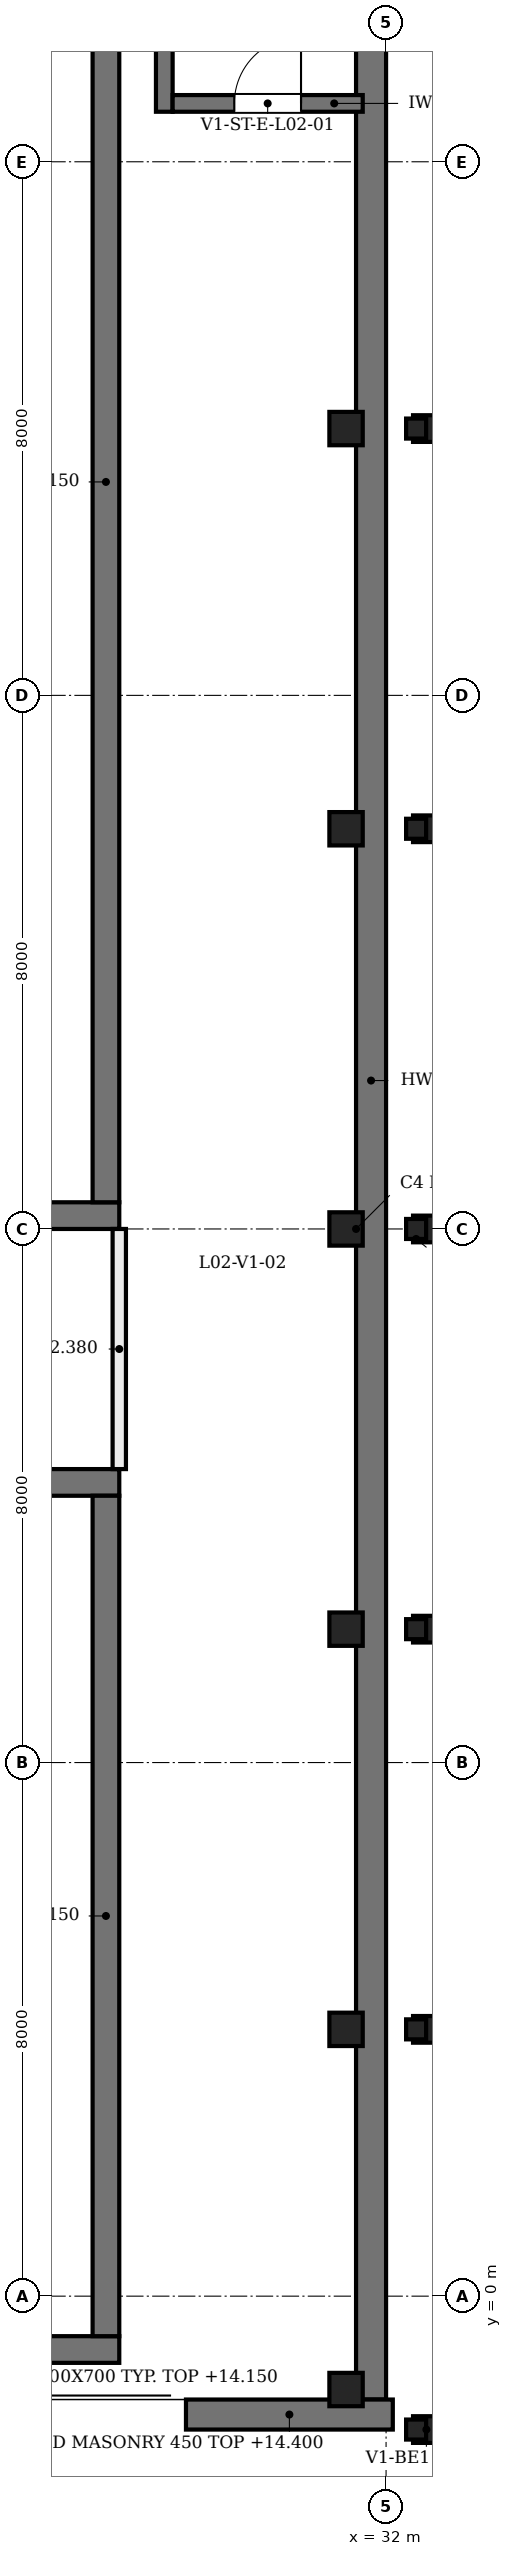
"""IFC4 building model, lengths in metres.
Left out: names, types, materials, properties, quantities, classifications, styles, units other than length and angle.
Written with IfcOpenShell. Run it as: python <this file> out.ifc"""

import sys

from ifc_helpers import new_model, si_unit, direction, frame, frame_2d, origin, origin_2d, place, context, subcontext, project, spatial, polyline, rectangle, hollow_rectangle, outline, extrude, element, fill, save


model = new_model("IFC4")
c1 = context("Model", 3, precision=1e-05, world=origin(), true_north=direction((0.0, 1.0)))
c2 = subcontext(c1, "Body", "Model", "MODEL_VIEW")
j1 = project(units=[si_unit("LENGTHUNIT", "METRE"), si_unit("PLANEANGLEUNIT", "RADIAN")], contexts=[c1])
p1 = place(None, origin())
s1 = spatial("IfcSite", under=j1, at=p1, CompositionType="ELEMENT")
p2 = place(p1, origin())
s2 = spatial("IfcBuilding", under=s1, at=p2, CompositionType="ELEMENT")
p3 = place(p2, frame((0.0, 0.0, 9.6)))
s3 = spatial("IfcBuildingStorey", under=s2, at=p3, CompositionType="ELEMENT", Elevation=9.6)
p4 = place(p3, frame((4.0, 16.2, 0.0), z_axis=(0.0, 0.0, 1.0), x_axis=(1.0, 0.0, 0.0)))
e1 = element("IfcWall", 1, at=p4, inside=s3, PredefinedType="SHEAR", context=c2, shape_type="SweptSolid", body=[
    extrude(rectangle(XDim=24.0, YDim=0.4, at=frame_2d((12.0, 0.0))), origin(), (0.0, 0.0, 1.0), 4.55),
])
p5 = place(p3, frame((27.8, 16.4, 0.0), z_axis=(0.0, 0.0, 1.0), x_axis=(0.0, 1.0, 0.0)))
e2 = element("IfcWall", 2, at=p5, inside=s3, PredefinedType="SHEAR", context=c2, shape_type="SweptSolid", body=[
    extrude(rectangle(XDim=22.6, YDim=0.4, at=frame_2d((11.3, 0.0))), origin(), (0.0, 0.0, 1.0), 4.55),
])
for number, where, z_axis, x_axis in (
    (3, (4.0, -0.8, 0.0), (0.0, 0.0, 1.0), (1.0, 0.0, 0.0)),
    (4, (4.0, 12.2, 0.0), (0.0, 0.0, 1.0), (1.0, 0.0, 0.0)),
):
    element("IfcWall", number, at=place(p3, frame(where, z_axis=z_axis, x_axis=x_axis)), inside=s3, PredefinedType="SHEAR", context=c2, shape_type="SweptSolid", body=[
        extrude(rectangle(XDim=24.0, YDim=0.4, at=frame_2d((12.0, 0.0))), origin(), (0.0, 0.0, 1.0), 4.55),
    ])
p6 = place(p3, frame((27.8, -0.6, 0.0), z_axis=(0.0, 0.0, 1.0), x_axis=(0.0, 1.0, 0.0)))
e5 = element("IfcWall", 5, at=p6, inside=s3, PredefinedType="SHEAR", context=c2, shape_type="SweptSolid", body=[
    extrude(rectangle(XDim=12.6, YDim=0.4, at=frame_2d((6.3, 0.0))), origin(), (0.0, 0.0, 1.0), 4.55),
])
for number, where, z_axis, x_axis in (
    (6, (31.4, -1.4, 0.0), (0.0, 0.0, 1.0), (1.0, 0.0, 0.0)),
    (7, (31.4, 4.0, 0.0), (0.0, 0.0, 1.0), (1.0, 0.0, 0.0)),
    (8, (31.4, 10.0, 0.0), (0.0, 0.0, 1.0), (1.0, 0.0, 0.0)),
    (9, (31.4, 16.0, 0.0), (0.0, 0.0, 1.0), (1.0, 0.0, 0.0)),
    (10, (31.4, 22.0, 0.0), (0.0, 0.0, 1.0), (1.0, 0.0, 0.0)),
    (11, (31.4, 28.0, 0.0), (0.0, 0.0, 1.0), (1.0, 0.0, 0.0)),
):
    element("IfcColumn", number, at=place(p3, frame(where, z_axis=z_axis, x_axis=x_axis)), inside=s3, PredefinedType="COLUMN", context=c2, shape_type="SweptSolid", body=[
        extrude(rectangle(XDim=0.5, YDim=0.5, at=origin_2d()), origin(), (0.0, 0.0, 1.0), 4.55),
    ])
p7 = place(p3, frame((32.726, -2.0, 0.0), z_axis=(-0.100917941267, 0.0, 0.994894752791), x_axis=(0.0, -1.0, 0.0)))
e12 = element("IfcColumn", 12, at=p7, inside=s3, PredefinedType="COLUMN", context=c2, shape_type="SweptSolid", body=[
    extrude(hollow_rectangle(XDim=0.4, YDim=0.4, WallThickness=0.016, InnerFilletRadius=0.016, OuterFilletRadius=0.024, at=origin_2d()), origin(), (0.0, 0.0, 1.0), 4.221),
])
p8 = place(p3, frame((32.45, -2.0, 4.22), z_axis=(0.0, 0.0, 1.0), x_axis=(1.0, 0.0, 0.0)))
e13 = element("IfcColumn", 13, at=p8, inside=s3, PredefinedType="COLUMN", context=c2, shape_type="SweptSolid", body=[
    extrude(hollow_rectangle(XDim=0.3, YDim=0.3, WallThickness=0.012, InnerFilletRadius=0.012, OuterFilletRadius=0.019, at=origin_2d()), origin(), (0.0, 0.0, 1.0), 0.579),
])
p9 = place(p3, frame((32.726, 4.0, 0.0), z_axis=(-0.100917941267, 0.0, 0.994894752791), x_axis=(0.0, -1.0, 0.0)))
e14 = element("IfcColumn", 14, at=p9, inside=s3, PredefinedType="COLUMN", context=c2, shape_type="SweptSolid", body=[
    extrude(hollow_rectangle(XDim=0.4, YDim=0.4, WallThickness=0.012, InnerFilletRadius=0.012, OuterFilletRadius=0.019, at=origin_2d()), origin(), (0.0, 0.0, 1.0), 4.221),
])
p10 = place(p3, frame((32.45, 4.0, 4.22), z_axis=(0.0, 0.0, 1.0), x_axis=(1.0, 0.0, 0.0)))
e15 = element("IfcColumn", 15, at=p10, inside=s3, PredefinedType="COLUMN", context=c2, shape_type="SweptSolid", body=[
    extrude(hollow_rectangle(XDim=0.3, YDim=0.3, WallThickness=0.012, InnerFilletRadius=0.012, OuterFilletRadius=0.019, at=origin_2d()), origin(), (0.0, 0.0, 1.0), 0.579),
])
p11 = place(p3, frame((32.726, 10.0, 0.0), z_axis=(-0.100917941267, 0.0, 0.994894752791), x_axis=(0.0, -1.0, 0.0)))
e16 = element("IfcColumn", 16, at=p11, inside=s3, PredefinedType="COLUMN", context=c2, shape_type="SweptSolid", body=[
    extrude(hollow_rectangle(XDim=0.4, YDim=0.4, WallThickness=0.012, InnerFilletRadius=0.012, OuterFilletRadius=0.019, at=origin_2d()), origin(), (0.0, 0.0, 1.0), 4.221),
])
p12 = place(p3, frame((32.45, 10.0, 4.22), z_axis=(0.0, 0.0, 1.0), x_axis=(1.0, 0.0, 0.0)))
e17 = element("IfcColumn", 17, at=p12, inside=s3, PredefinedType="COLUMN", context=c2, shape_type="SweptSolid", body=[
    extrude(hollow_rectangle(XDim=0.3, YDim=0.3, WallThickness=0.012, InnerFilletRadius=0.012, OuterFilletRadius=0.019, at=origin_2d()), origin(), (0.0, 0.0, 1.0), 0.579),
])
p13 = place(p3, frame((32.726, 16.0, 0.0), z_axis=(-0.100917941267, 0.0, 0.994894752791), x_axis=(0.0, -1.0, 0.0)))
e18 = element("IfcColumn", 18, at=p13, inside=s3, PredefinedType="COLUMN", context=c2, shape_type="SweptSolid", body=[
    extrude(hollow_rectangle(XDim=0.4, YDim=0.4, WallThickness=0.012, InnerFilletRadius=0.012, OuterFilletRadius=0.019, at=origin_2d()), origin(), (0.0, 0.0, 1.0), 4.221),
])
p14 = place(p3, frame((32.45, 16.0, 4.22), z_axis=(0.0, 0.0, 1.0), x_axis=(1.0, 0.0, 0.0)))
e19 = element("IfcColumn", 19, at=p14, inside=s3, PredefinedType="COLUMN", context=c2, shape_type="SweptSolid", body=[
    extrude(hollow_rectangle(XDim=0.3, YDim=0.3, WallThickness=0.012, InnerFilletRadius=0.012, OuterFilletRadius=0.019, at=origin_2d()), origin(), (0.0, 0.0, 1.0), 0.579),
])
p15 = place(p3, frame((32.726, 22.0, 0.0), z_axis=(-0.100917941267, 0.0, 0.994894752791), x_axis=(0.0, -1.0, 0.0)))
e20 = element("IfcColumn", 20, at=p15, inside=s3, PredefinedType="COLUMN", context=c2, shape_type="SweptSolid", body=[
    extrude(hollow_rectangle(XDim=0.4, YDim=0.4, WallThickness=0.012, InnerFilletRadius=0.012, OuterFilletRadius=0.019, at=origin_2d()), origin(), (0.0, 0.0, 1.0), 4.221),
])
p16 = place(p3, frame((32.45, 22.0, 4.22), z_axis=(0.0, 0.0, 1.0), x_axis=(1.0, 0.0, 0.0)))
e21 = element("IfcColumn", 21, at=p16, inside=s3, PredefinedType="COLUMN", context=c2, shape_type="SweptSolid", body=[
    extrude(hollow_rectangle(XDim=0.3, YDim=0.3, WallThickness=0.012, InnerFilletRadius=0.012, OuterFilletRadius=0.019, at=origin_2d()), origin(), (0.0, 0.0, 1.0), 0.579),
])
p17 = place(p3, frame((32.726, 28.0, 0.0), z_axis=(-0.100917941267, 0.0, 0.994894752791), x_axis=(0.0, -1.0, 0.0)))
e22 = element("IfcColumn", 22, at=p17, inside=s3, PredefinedType="COLUMN", context=c2, shape_type="SweptSolid", body=[
    extrude(hollow_rectangle(XDim=0.4, YDim=0.4, WallThickness=0.012, InnerFilletRadius=0.012, OuterFilletRadius=0.019, at=origin_2d()), origin(), (0.0, 0.0, 1.0), 4.221),
])
p18 = place(p3, frame((32.45, 28.0, 4.22), z_axis=(0.0, 0.0, 1.0), x_axis=(1.0, 0.0, 0.0)))
e23 = element("IfcColumn", 23, at=p18, inside=s3, PredefinedType="COLUMN", context=c2, shape_type="SweptSolid", body=[
    extrude(hollow_rectangle(XDim=0.3, YDim=0.3, WallThickness=0.012, InnerFilletRadius=0.012, OuterFilletRadius=0.019, at=origin_2d()), origin(), (0.0, 0.0, 1.0), 0.579),
])
p19 = place(p3, frame((31.775, -1.55, 0.0), z_axis=(0.0, 0.0, 1.0), x_axis=(0.0, 1.0, 0.0)))
e24 = element("IfcWall", 24, at=p19, inside=s3, PredefinedType="SOLIDWALL", context=c2, shape_type="SweptSolid", body=[
    extrude(rectangle(XDim=41.1, YDim=0.45, at=frame_2d((20.55, 0.0))), origin(), (0.0, 0.0, 1.0), 4.8),
])
p20 = place(p3, frame((29.0, -1.775, 0.0), z_axis=(0.0, 0.0, 1.0), x_axis=(1.0, 0.0, 0.0)))
e25 = element("IfcWall", 25, at=p20, inside=s3, PredefinedType="SOLIDWALL", context=c2, shape_type="SweptSolid", body=[
    extrude(outline(polyline([(0.0, 0.0), (3.101, 0.0), (3.101, 4.553), (2.862, 4.781), (2.843, 4.8), (2.624, 4.8), (2.385, 4.8), (2.147, 4.8), (1.908, 4.8), (1.67, 4.8), (1.431, 4.8), (1.193, 4.8), (0.954, 4.8), (0.716, 4.8), (0.477, 4.8), (0.239, 4.8), (0.0, 4.8), (0.0, 0.0)])), frame((0.0, 0.225, 0.0), z_axis=(0.0, -1.0, 0.0), x_axis=(1.0, 0.0, 0.0)), (0.0, 0.0, 1.0), 0.45),
])
p21 = place(p3, frame((28.675, 32.75, 0.0), z_axis=(0.0, 0.0, 1.0), x_axis=(0.0, 1.0, 0.0)))
e26 = element("IfcWall", 26, at=p21, inside=s3, PredefinedType="SOLIDWALL", context=c2, shape_type="SweptSolid", body=[
    extrude(rectangle(XDim=6.8, YDim=0.25, at=frame_2d((3.4, 0.0))), origin(), (0.0, 0.0, 1.0), 4.55),
])
p22 = place(p3, frame((28.8, 32.875, 0.0), z_axis=(0.0, 0.0, 1.0), x_axis=(1.0, 0.0, 0.0)))
e27 = element("IfcWall", 27, at=p22, inside=s3, PredefinedType="SOLIDWALL", context=c2, shape_type="SweptSolid", body=[
    extrude(rectangle(XDim=2.85, YDim=0.25, at=frame_2d((1.425, 0.0))), origin(), (0.0, 0.0, 1.0), 4.55),
])
p23 = place(p22, frame((0.925, 0.0, 0.0)))
e28 = element("IfcOpeningElement", 28, at=p23, cuts=e27, PredefinedType="OPENING", context=c2, shape_type="SweptSolid", body=[
    extrude(rectangle(XDim=1.0, YDim=2.1, at=frame_2d((0.5, 1.05))), frame((0.0, 0.135, 0.0), z_axis=(0.0, -1.0, 0.0), x_axis=(1.0, 0.0, 0.0)), (0.0, 0.0, 1.0), 0.27),
])
p24 = place(p3, frame((28.0, 12.4, 0.0), z_axis=(0.0, 0.0, 1.0), x_axis=(0.0, 1.0, 0.0)))
e29 = element("IfcWall", 29, at=p24, inside=s3, PredefinedType="PARTITIONING", context=c2, shape_type="SweptSolid", body=[
    extrude(rectangle(XDim=3.6, YDim=0.2, at=frame_2d((1.8, 0.0))), origin(), (0.0, 0.0, 1.0), 2.78),
])
p25 = place(p23, frame((1.0, 0.0, 0.0), z_axis=(0.0, 0.0, 1.0), x_axis=(-1.0, 0.0, 0.0)))
e30 = element("IfcDoor", 30, at=p25, inside=s3, OperationType="SINGLE_SWING_RIGHT", PredefinedType="DOOR", context=c2, shape_type="SweptSolid", body=[
    extrude(rectangle(XDim=1.0, YDim=2.1, at=frame_2d((0.5, 1.05))), frame((0.0, 0.025, 0.0), z_axis=(0.0, -1.0, 0.0), x_axis=(1.0, 0.0, 0.0)), (0.0, 0.0, 1.0), 0.05),
])
fill(e28, e30)
save(model, sys.argv[1])
